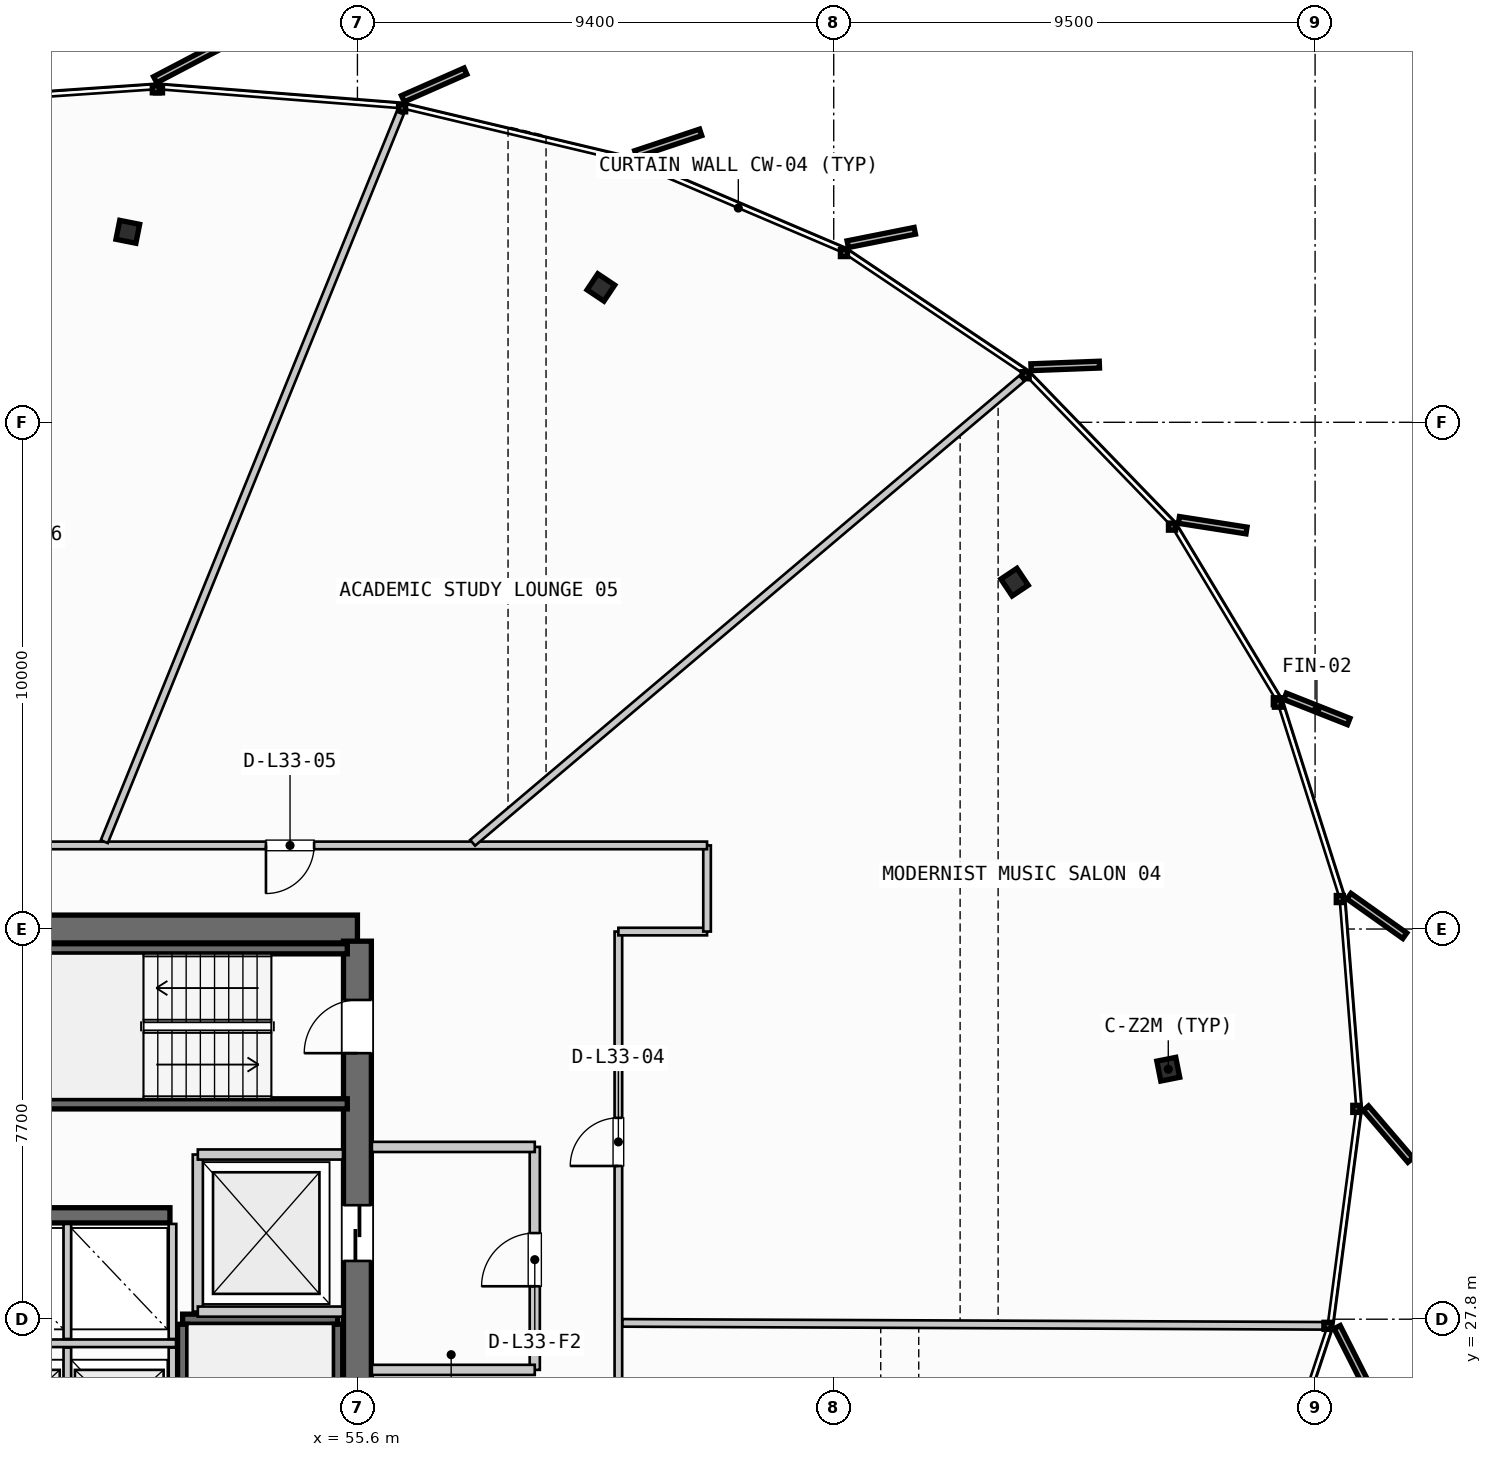
"""IFC4 building model, lengths in metres.
Left out: names, types, materials, properties, quantities, classifications, styles, units other than length and angle.
Written with IfcOpenShell. Run it as: python <this file> out.ifc"""

import sys

from ifc_helpers import new_model, si_unit, direction, frame, frame_2d, origin, origin_2d, place, context, subcontext, project, spatial, rectangle, i_section, extrude, source, transform, mapped, element, fill, save


model = new_model("IFC4")
c1 = context("Model", 3, precision=1e-05, world=origin(), true_north=direction((0.0, 1.0)))
c2 = subcontext(c1, "Body", "Model", "MODEL_VIEW")
j1 = project(units=[si_unit("LENGTHUNIT", "METRE"), si_unit("PLANEANGLEUNIT", "RADIAN")], contexts=[c1])
p1 = place(None, origin())
s1 = spatial("IfcSite", under=j1, at=p1, CompositionType="ELEMENT")
p2 = place(p1, origin())
s2 = spatial("IfcBuilding", under=s1, at=p2, CompositionType="ELEMENT")
p3 = place(p2, frame((0.0, 0.0, 132.35)))
s3 = spatial("IfcBuildingStorey", under=s2, at=p3, CompositionType="ELEMENT", Elevation=132.35)
p4 = place(p3, frame((55.6, 35.5, 0.0), z_axis=(0.0, 0.0, 1.0), x_axis=(-1.0, 0.0, 0.0)))
e1 = element("IfcWall", 1, at=p4, inside=s3, PredefinedType="SHEAR", context=c2, shape_type="SweptSolid", body=[
    extrude(rectangle(XDim=17.6, YDim=0.55, at=frame_2d((8.8, 0.0))), origin(), (0.0, 0.0, 1.0), 3.3),
])
p5 = place(p4, frame((8.05, 0.0, 0.0)))
e2 = element("IfcOpeningElement", 2, at=p5, cuts=e1, PredefinedType="OPENING", context=c2, shape_type="SweptSolid", body=[
    extrude(rectangle(XDim=1.5, YDim=2.2, at=frame_2d((0.75, 1.1))), frame((0.0, 0.285, 0.0), z_axis=(0.0, -1.0, 0.0), x_axis=(1.0, 0.0, 0.0)), (0.0, 0.0, 1.0), 0.57),
])
p6 = place(p4, frame((14.95, 0.0, 0.0)))
e3 = element("IfcOpeningElement", 3, at=p6, cuts=e1, PredefinedType="OPENING", context=c2, shape_type="SweptSolid", body=[
    extrude(rectangle(XDim=1.4, YDim=2.3, at=frame_2d((0.7, 1.15))), frame((0.0, 0.285, 0.0), z_axis=(0.0, -1.0, 0.0), x_axis=(1.0, 0.0, 0.0)), (0.0, 0.0, 1.0), 0.57),
])
p7 = place(p4, frame((12.9, 0.0, 0.0)))
e4 = element("IfcOpeningElement", 4, at=p7, cuts=e1, PredefinedType="OPENING", context=c2, shape_type="SweptSolid", body=[
    extrude(rectangle(XDim=0.9, YDim=2.15, at=frame_2d((0.45, 1.075))), frame((0.0, 0.285, 0.0), z_axis=(0.0, -1.0, 0.0), x_axis=(1.0, 0.0, 0.0)), (0.0, 0.0, 1.0), 0.57),
])
p8 = place(p4, frame((10.6, 0.0, 0.0)))
e5 = element("IfcOpeningElement", 5, at=p8, cuts=e1, PredefinedType="OPENING", context=c2, shape_type="SweptSolid", body=[
    extrude(rectangle(XDim=0.95, YDim=2.15, at=frame_2d((0.475, 1.075))), frame((0.0, 0.285, 0.0), z_axis=(0.0, -1.0, 0.0), x_axis=(1.0, 0.0, 0.0)), (0.0, 0.0, 1.0), 0.57),
])
p9 = place(p3, frame((55.6, 20.34, 0.0), z_axis=(0.0, 0.0, 1.0), x_axis=(0.0, 1.0, 0.0)))
e6 = element("IfcWall", 6, at=p9, inside=s3, PredefinedType="SHEAR", context=c2, shape_type="SweptSolid", body=[
    extrude(rectangle(XDim=14.92, YDim=0.55, at=frame_2d((7.46, 0.0))), origin(), (0.0, 0.0, 1.0), 3.3),
])
p10 = place(p9, frame((12.71, 0.0, 0.0)))
e7 = element("IfcOpeningElement", 7, at=p10, cuts=e6, PredefinedType="OPENING", context=c2, shape_type="SweptSolid", body=[
    extrude(rectangle(XDim=1.05, YDim=2.15, at=frame_2d((0.525, 1.075))), frame((0.0, 0.285, 0.0), z_axis=(0.0, -1.0, 0.0), x_axis=(1.0, 0.0, 0.0)), (0.0, 0.0, 1.0), 0.57),
])
p11 = place(p9, frame((8.61, 0.0, 0.0)))
e8 = element("IfcOpeningElement", 8, at=p11, cuts=e6, PredefinedType="OPENING", context=c2, shape_type="SweptSolid", body=[
    extrude(rectangle(XDim=1.1, YDim=2.2, at=frame_2d((0.55, 1.1))), frame((0.0, 0.285, 0.0), z_axis=(0.0, -1.0, 0.0), x_axis=(1.0, 0.0, 0.0)), (0.0, 0.0, 1.0), 0.57),
])
p12 = place(p3, frame((47.65, 29.85, 0.0), z_axis=(0.0, 0.0, 1.0), x_axis=(1.0, 0.0, 0.0)))
e9 = element("IfcWall", 9, at=p12, inside=s3, PredefinedType="SHEAR", context=c2, shape_type="SweptSolid", body=[
    extrude(rectangle(XDim=4.25, YDim=0.3, at=frame_2d((2.125, 0.0))), origin(), (0.0, 0.0, 1.0), 3.3),
])
m1 = source(origin(), c2, "Body", "SweptSolid", [
    extrude(i_section(OverallWidth=0.401, OverallDepth=0.381, WebThickness=0.032, FlangeThickness=0.051, FilletRadius=0.015, at=origin_2d()), origin(), (0.0, 0.0, 1.0), 3.3),
])
for number, where, z_axis, x_axis in (
    (10, (71.603, 32.733, 0.0), (0.0, 0.0, 1.0), (0.981, 0.195, 0.0)),
    (11, (68.569, 42.345, 0.0), (0.0, 0.0, 1.0), (0.831, 0.556, 0.0)),
    (12, (60.405, 48.161, 0.0), (0.0, 0.0, 1.0), (0.556, 0.831, 0.0)),
    (13, (51.069, 49.259, 0.0), (0.0, 0.0, 1.0), (0.195, 0.981, 0.0)),
):
    element("IfcColumn", number, at=place(p3, frame(where, z_axis=z_axis, x_axis=x_axis)), inside=s3, PredefinedType="COLUMN", context=c2, shape_type="MappedRepresentation", body=[
        mapped(m1, transform((0.0, 0.0, 0.0), scale=1.0)),
    ])
p13 = place(p3, frame((52.15, 27.8, 0.0), z_axis=(0.0, 0.0, 1.0), x_axis=(1.0, 0.0, 0.0)))
e14 = element("IfcWall", 14, at=p13, inside=s3, PredefinedType="SHEAR", context=c2, shape_type="SweptSolid", body=[
    extrude(rectangle(XDim=3.06, YDim=0.2, at=frame_2d((1.53, 0.0))), origin(), (0.0, 0.0, 1.0), 3.3),
])
for number, where, z_axis, x_axis in (
    (15, (55.21, 27.7, 0.0), (0.0, 0.0, 1.0), (0.0, -1.0, 0.0)),
    (16, (52.15, 20.35, 0.0), (0.0, 0.0, 1.0), (0.0, 1.0, 0.0)),
    (17, (48.05, 35.11, 0.0), (0.0, 0.0, 1.0), (1.0, 0.0, 0.0)),
    (18, (55.4, 32.05, 0.0), (0.0, 0.0, 1.0), (-1.0, 0.0, 0.0)),
):
    element("IfcWall", number, at=place(p3, frame(where, z_axis=z_axis, x_axis=x_axis)), inside=s3, PredefinedType="SHEAR", context=c2, shape_type="SweptSolid", body=[
        extrude(rectangle(XDim=7.35, YDim=0.2, at=frame_2d((3.675, 0.0))), origin(), (0.0, 0.0, 1.0), 3.3),
    ])
p14 = place(p3, frame((52.45, 27.95, 0.0), z_axis=(0.0, 0.0, 1.0), x_axis=(0.0, 1.0, 0.0)))
e19 = element("IfcWall", 19, at=p14, inside=s3, PredefinedType="PARTITIONING", context=c2, shape_type="SweptSolid", body=[
    extrude(rectangle(XDim=3.1, YDim=0.2, at=frame_2d((1.55, 0.0))), origin(), (0.0, 0.0, 1.0), 2.445),
])
for number, where, z_axis, x_axis in (
    (20, (52.45, 27.95, 0.0), (0.0, 0.0, 1.0), (1.0, 0.0, 0.0)),
    (21, (52.45, 31.05, 0.0), (0.0, 0.0, 1.0), (1.0, 0.0, 0.0)),
):
    element("IfcWall", number, at=place(p3, frame(where, z_axis=z_axis, x_axis=x_axis)), inside=s3, PredefinedType="PARTITIONING", context=c2, shape_type="SweptSolid", body=[
        extrude(rectangle(XDim=2.865, YDim=0.2, at=frame_2d((1.433, 0.0))), origin(), (0.0, 0.0, 1.0), 2.445),
    ])
p15 = place(p3, frame((59.1, 26.8, 0.0), z_axis=(0.0, 0.0, 1.0), x_axis=(0.0, 1.0, 0.0)))
e22 = element("IfcWall", 22, at=p15, inside=s3, PredefinedType="PARTITIONING", context=c2, shape_type="SweptSolid", body=[
    extrude(rectangle(XDim=4.4, YDim=0.2, at=frame_2d((2.2, 0.0))), origin(), (0.0, 0.0, 1.0), 2.445),
])
p16 = place(p15, frame((1.65, 0.0, 0.0)))
e23 = element("IfcOpeningElement", 23, at=p16, cuts=e22, PredefinedType="OPENING", context=c2, shape_type="SweptSolid", body=[
    extrude(rectangle(XDim=1.05, YDim=2.15, at=frame_2d((0.525, 1.075))), frame((0.0, 0.11, 0.0), z_axis=(0.0, -1.0, 0.0), x_axis=(1.0, 0.0, 0.0)), (0.0, 0.0, 1.0), 0.22),
])
for number, where, z_axis, x_axis in (
    (24, (55.885, 26.8, 0.0), (0.0, 0.0, 1.0), (1.0, 0.0, 0.0)),
    (25, (55.885, 31.2, 0.0), (0.0, 0.0, 1.0), (1.0, 0.0, 0.0)),
):
    element("IfcWall", number, at=place(p3, frame(where, z_axis=z_axis, x_axis=x_axis)), inside=s3, PredefinedType="PARTITIONING", context=c2, shape_type="SweptSolid", body=[
        extrude(rectangle(XDim=3.215, YDim=0.2, at=frame_2d((1.607, 0.0))), origin(), (0.0, 0.0, 1.0), 2.445),
    ])
p17 = place(p3, frame((47.7, 27.325, 0.0), z_axis=(0.0, 0.0, 1.0), x_axis=(1.0, 0.0, 0.0)))
e26 = element("IfcWall", 26, at=p17, inside=s3, PredefinedType="PARTITIONING", context=c2, shape_type="SweptSolid", body=[
    extrude(rectangle(XDim=4.32, YDim=0.15, at=frame_2d((2.16, 0.0))), origin(), (0.0, 0.0, 1.0), 2.445),
])
for number, where, z_axis, x_axis in (
    (27, (49.875, 24.92, 0.0), (0.0, 0.0, 1.0), (0.0, 1.0, 0.0)),
    (28, (51.95, 24.92, 0.0), (0.0, 0.0, 1.0), (0.0, 1.0, 0.0)),
):
    element("IfcWall", number, at=place(p3, frame(where, z_axis=z_axis, x_axis=x_axis)), inside=s3, PredefinedType="PARTITIONING", context=c2, shape_type="SweptSolid", body=[
        extrude(rectangle(XDim=2.32, YDim=0.15, at=frame_2d((1.16, 0.0))), origin(), (0.0, 0.0, 1.0), 2.445),
    ])
for number, where, z_axis, x_axis in (
    (29, (49.875, 27.41, 0.0), (0.0, 0.0, 1.0), (0.0, 1.0, 0.0)),
    (30, (51.95, 27.41, 0.0), (0.0, 0.0, 1.0), (0.0, 1.0, 0.0)),
):
    element("IfcWall", number, at=place(p3, frame(where, z_axis=z_axis, x_axis=x_axis)), inside=s3, PredefinedType="PARTITIONING", context=c2, shape_type="SweptSolid", body=[
        extrude(rectangle(XDim=2.27, YDim=0.15, at=frame_2d((1.135, 0.0))), origin(), (0.0, 0.0, 1.0), 2.445),
    ])
p18 = place(p3, frame((60.75, 20.15, 0.0), z_axis=(0.0, 0.0, 1.0), x_axis=(0.0, 1.0, 0.0)))
e31 = element("IfcWall", 31, at=p18, inside=s3, PredefinedType="PARTITIONING", context=c2, shape_type="SweptSolid", body=[
    extrude(rectangle(XDim=15.3, YDim=0.15, at=frame_2d((7.65, 0.0))), origin(), (0.0, 0.0, 1.0), 2.445),
])
p19 = place(p18, frame((3.604, 0.0, 0.0)))
e32 = element("IfcOpeningElement", 32, at=p19, cuts=e31, PredefinedType="OPENING", context=c2, shape_type="SweptSolid", body=[
    extrude(rectangle(XDim=0.95, YDim=2.15, at=frame_2d((0.475, 1.075))), frame((0.0, 0.085, 0.0), z_axis=(0.0, -1.0, 0.0), x_axis=(1.0, 0.0, 0.0)), (0.0, 0.0, 1.0), 0.17),
])
p20 = place(p18, frame((10.674, 0.0, 0.0)))
e33 = element("IfcOpeningElement", 33, at=p20, cuts=e31, PredefinedType="OPENING", context=c2, shape_type="SweptSolid", body=[
    extrude(rectangle(XDim=0.95, YDim=2.15, at=frame_2d((0.475, 1.075))), frame((0.0, 0.085, 0.0), z_axis=(0.0, -1.0, 0.0), x_axis=(1.0, 0.0, 0.0)), (0.0, 0.0, 1.0), 0.17),
])
p21 = place(p3, frame((60.75, 35.45, 0.0), z_axis=(0.0, 0.0, 1.0), x_axis=(1.0, 0.0, 0.0)))
e34 = element("IfcWall", 34, at=p21, inside=s3, PredefinedType="PARTITIONING", context=c2, shape_type="SweptSolid", body=[
    extrude(rectangle(XDim=1.75, YDim=0.15, at=frame_2d((0.875, 0.0))), origin(), (0.0, 0.0, 1.0), 2.445),
])
p22 = place(p3, frame((62.5, 35.45, 0.0), z_axis=(0.0, 0.0, 1.0), x_axis=(0.0, 1.0, 0.0)))
e35 = element("IfcWall", 35, at=p22, inside=s3, PredefinedType="PARTITIONING", context=c2, shape_type="SweptSolid", body=[
    extrude(rectangle(XDim=1.7, YDim=0.15, at=frame_2d((0.85, 0.0))), origin(), (0.0, 0.0, 1.0), 2.445),
])
p23 = place(p3, frame((62.5, 37.15, 0.0), z_axis=(0.0, 0.0, 1.0), x_axis=(-1.0, 0.0, 0.0)))
e36 = element("IfcWall", 36, at=p23, inside=s3, PredefinedType="PARTITIONING", context=c2, shape_type="SweptSolid", body=[
    extrude(rectangle(XDim=31.4, YDim=0.15, at=frame_2d((15.7, 0.0))), origin(), (0.0, 0.0, 1.0), 2.445),
])
p24 = place(p23, frame((7.755, 0.0, 0.0)))
e37 = element("IfcOpeningElement", 37, at=p24, cuts=e36, PredefinedType="OPENING", context=c2, shape_type="SweptSolid", body=[
    extrude(rectangle(XDim=0.95, YDim=2.15, at=frame_2d((0.475, 1.075))), frame((0.0, 0.085, 0.0), z_axis=(0.0, -1.0, 0.0), x_axis=(1.0, 0.0, 0.0)), (0.0, 0.0, 1.0), 0.17),
])
p25 = place(p23, frame((15.451, 0.0, 0.0)))
e38 = element("IfcOpeningElement", 38, at=p25, cuts=e36, PredefinedType="OPENING", context=c2, shape_type="SweptSolid", body=[
    extrude(rectangle(XDim=0.95, YDim=2.15, at=frame_2d((0.475, 1.075))), frame((0.0, 0.085, 0.0), z_axis=(0.0, -1.0, 0.0), x_axis=(1.0, 0.0, 0.0)), (0.0, 0.0, 1.0), 0.17),
])
p26 = place(p23, frame((22.642, 0.0, 0.0)))
e39 = element("IfcOpeningElement", 39, at=p26, cuts=e36, PredefinedType="OPENING", context=c2, shape_type="SweptSolid", body=[
    extrude(rectangle(XDim=0.95, YDim=2.15, at=frame_2d((0.475, 1.075))), frame((0.0, 0.085, 0.0), z_axis=(0.0, -1.0, 0.0), x_axis=(1.0, 0.0, 0.0)), (0.0, 0.0, 1.0), 0.17),
])
p27 = place(p3, frame((60.83, 27.728, 0.0), z_axis=(0.0, 0.0, 1.0), x_axis=(0.999991231603, -0.004187686361, 0.0)))
e40 = element("IfcWall", 40, at=p27, inside=s3, PredefinedType="PARTITIONING", context=c2, shape_type="SweptSolid", body=[
    extrude(rectangle(XDim=13.817, YDim=0.15, at=frame_2d((6.908, 0.0))), origin(), (0.0, 0.0, 1.0), 2.445),
])
p28 = place(p3, frame((57.874, 37.202, 0.0), z_axis=(0.0, 0.0, 1.0), x_axis=(0.763654407018, 0.645625236993, 0.0)))
e41 = element("IfcWall", 41, at=p28, inside=s3, PredefinedType="PARTITIONING", context=c2, shape_type="SweptSolid", body=[
    extrude(rectangle(XDim=14.192, YDim=0.15, at=frame_2d((7.096, 0.0))), origin(), (0.0, 0.0, 1.0), 2.445),
])
p29 = place(p3, frame((50.604, 37.224, 0.0), z_axis=(0.0, 0.0, 1.0), x_axis=(0.376264805721, 0.926512167203, 0.0)))
e42 = element("IfcWall", 42, at=p29, inside=s3, PredefinedType="PARTITIONING", context=c2, shape_type="SweptSolid", body=[
    extrude(rectangle(XDim=15.52, YDim=0.15, at=frame_2d((7.76, 0.0))), origin(), (0.0, 0.0, 1.0), 2.445),
])
m2 = source(origin(), c2, "Body", "SweptSolid", [
    extrude(rectangle(XDim=1.05, YDim=2.15, at=frame_2d((0.525, 1.075))), frame((0.0, 0.025, 0.0), z_axis=(0.0, -1.0, 0.0), x_axis=(1.0, 0.0, 0.0)), (0.0, 0.0, 1.0), 0.05),
])
p30 = place(p10, origin())
e43 = element("IfcDoor", 43, at=p30, inside=s3, OperationType="SINGLE_SWING_LEFT", PredefinedType="DOOR", context=c2, shape_type="MappedRepresentation", body=[
    mapped(m2, transform((0.0, 0.0, 0.0), scale=1.0)),
])
fill(e7, e43)
m3 = source(origin(), c2, "Body", "SweptSolid", [
    extrude(rectangle(XDim=1.1, YDim=2.2, at=frame_2d((0.55, 1.1))), frame((0.0, 0.025, 0.0), z_axis=(0.0, -1.0, 0.0), x_axis=(1.0, 0.0, 0.0)), (0.0, 0.0, 1.0), 0.05),
])
p31 = place(p11, origin())
e44 = element("IfcDoor", 44, at=p31, inside=s3, OperationType="SLIDING_TO_RIGHT", PredefinedType="DOOR", context=c2, shape_type="MappedRepresentation", body=[
    mapped(m3, transform((0.0, 0.0, 0.0), scale=1.0)),
])
fill(e8, e44)
p32 = place(p16, origin())
e45 = element("IfcDoor", 45, at=p32, inside=s3, OperationType="SINGLE_SWING_LEFT", PredefinedType="DOOR", context=c2, shape_type="MappedRepresentation", body=[
    mapped(m2, transform((0.0, 0.0, 0.0), scale=1.0)),
])
fill(e23, e45)
m4 = source(origin(), c2, "Body", "SweptSolid", [
    extrude(rectangle(XDim=0.95, YDim=2.15, at=frame_2d((0.475, 1.075))), frame((0.0, 0.025, 0.0), z_axis=(0.0, -1.0, 0.0), x_axis=(1.0, 0.0, 0.0)), (0.0, 0.0, 1.0), 0.05),
])
p33 = place(p20, origin())
e46 = element("IfcDoor", 46, at=p33, inside=s3, OperationType="SINGLE_SWING_LEFT", PredefinedType="DOOR", context=c2, shape_type="MappedRepresentation", body=[
    mapped(m4, transform((0.0, 0.0, 0.0), scale=1.0)),
])
fill(e33, e46)
p34 = place(p24, origin())
e47 = element("IfcDoor", 47, at=p34, inside=s3, OperationType="SINGLE_SWING_RIGHT", PredefinedType="DOOR", context=c2, shape_type="MappedRepresentation", body=[
    mapped(m4, transform((0.0, 0.0, 0.0), scale=1.0)),
])
fill(e37, e47)
save(model, sys.argv[1])
